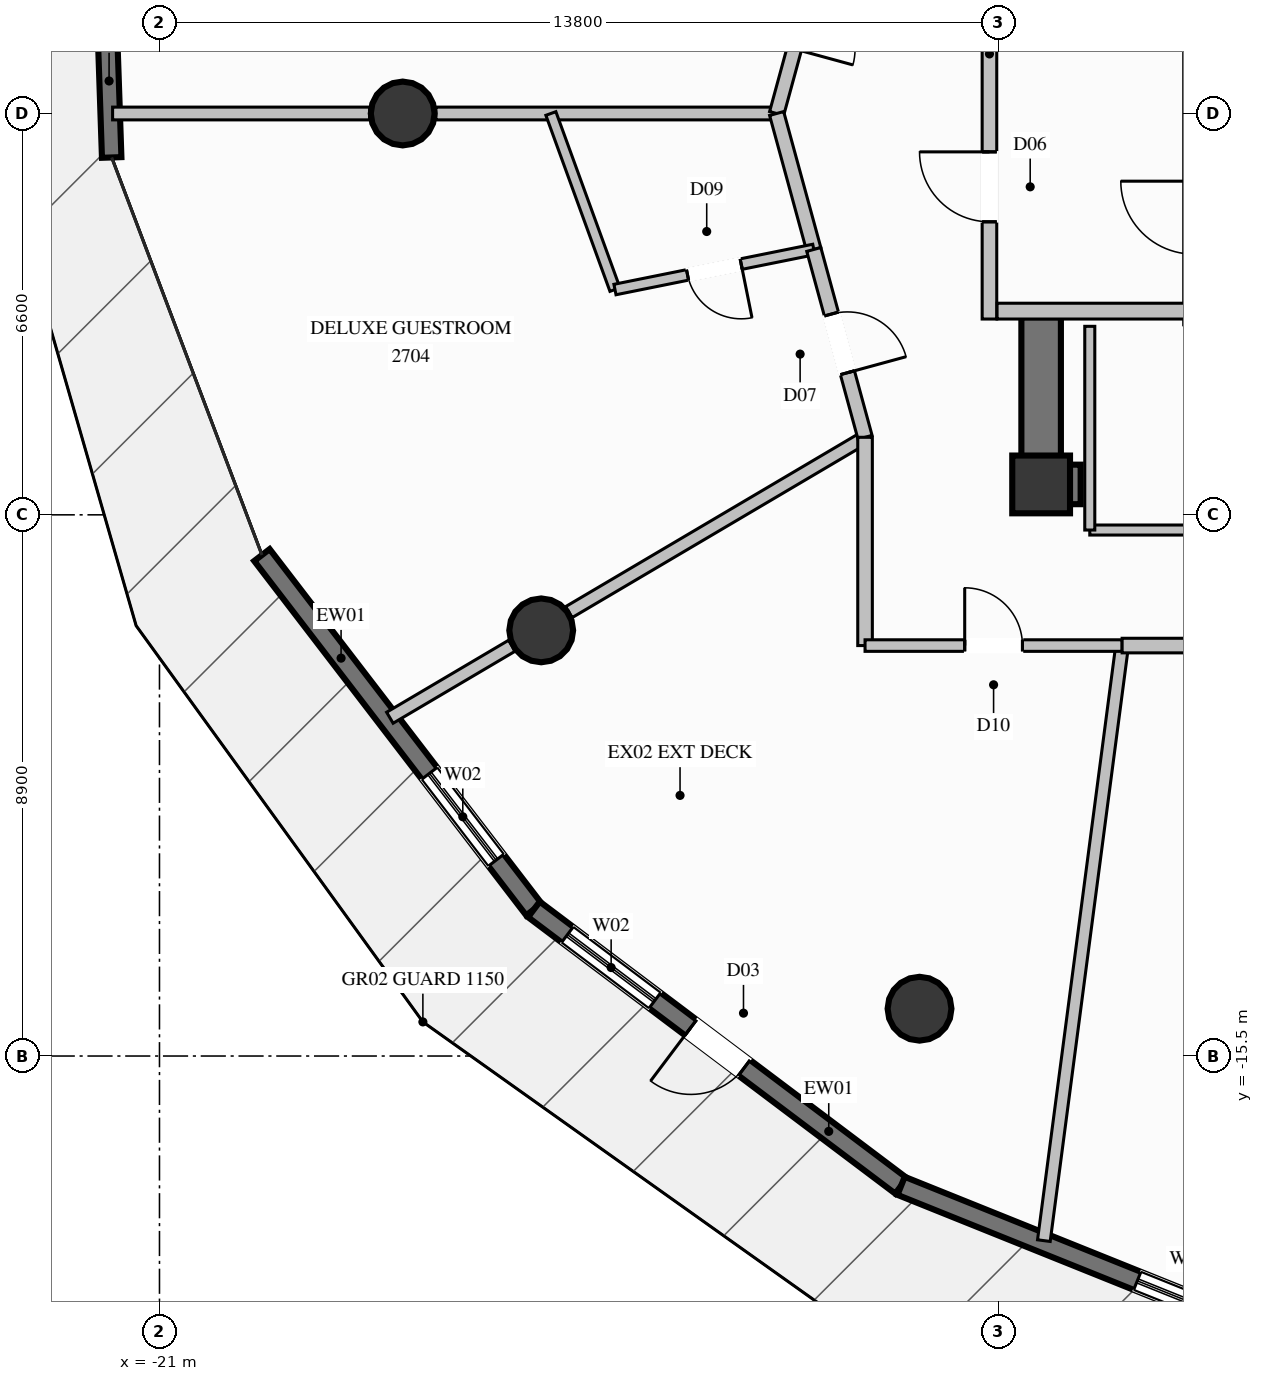
"""IFC4 building model, lengths in metres.
Left out: names, types, materials, properties, quantities, classifications, styles, units other than length and angle.
Written with IfcOpenShell. Run it as: python <this file> out.ifc"""

import sys

from ifc_helpers import new_model, si_unit, direction, frame, frame_2d, origin, origin_2d, place, context, subcontext, project, spatial, rectangle, circle, extrude, element, fill, save


model = new_model("IFC4")
c1 = context("Model", 3, precision=1e-05, world=origin(), true_north=direction((0.0, 1.0)))
c2 = subcontext(c1, "Body", "Model", "MODEL_VIEW")
j1 = project(units=[si_unit("LENGTHUNIT", "METRE"), si_unit("PLANEANGLEUNIT", "RADIAN")], contexts=[c1])
p1 = place(None, origin())
s1 = spatial("IfcSite", under=j1, at=p1, CompositionType="ELEMENT")
p2 = place(p1, origin())
s2 = spatial("IfcBuilding", under=s1, at=p2, CompositionType="ELEMENT")
p3 = place(p2, frame((0.0, 0.0, 102.6)))
s3 = spatial("IfcBuildingStorey", under=s2, at=p3, CompositionType="ELEMENT", Elevation=102.6)
p4 = place(p3, frame((-6.5, -6.1, 0.0), z_axis=(0.0, 0.0, 1.0), x_axis=(1.0, 0.0, 0.0)))
e1 = element("IfcColumn", 1, at=p4, inside=s3, PredefinedType="COLUMN", context=c2, shape_type="SweptSolid", body=[
    extrude(rectangle(XDim=0.95, YDim=0.95, at=origin_2d()), origin(), (0.0, 0.0, 1.0), 3.6),
])
p5 = place(p3, frame((-6.175, -6.1, 0.0), z_axis=(0.0, 0.0, 1.0), x_axis=(1.0, 0.0, 0.0)))
e2 = element("IfcWall", 2, at=p5, inside=s3, PredefinedType="SHEAR", context=c2, shape_type="SweptSolid", body=[
    extrude(rectangle(XDim=0.325, YDim=0.65, at=frame_2d((0.163, 0.0))), origin(), (0.0, 0.0, 1.0), 3.6),
])
p6 = place(p3, frame((-6.5, -6.425, 0.0), z_axis=(0.0, 0.0, 1.0), x_axis=(0.0, 1.0, 0.0)))
e3 = element("IfcWall", 3, at=p6, inside=s3, PredefinedType="SHEAR", context=c2, shape_type="SweptSolid", body=[
    extrude(rectangle(XDim=3.075, YDim=0.65, at=frame_2d((1.538, 0.0))), origin(), (0.0, 0.0, 1.0), 3.6),
])
for number, where, z_axis, x_axis in (
    (4, (-17.0, 0.0, 0.0), (0.0, 0.0, 1.0), (1.0, 0.0, 0.0)),
    (5, (-14.722, -8.5, 0.0), (0.0, 0.0, 1.0), (1.0, 0.0, 0.0)),
    (6, (-8.5, -14.722, 0.0), (0.0, 0.0, 1.0), (1.0, 0.0, 0.0)),
):
    element("IfcColumn", number, at=place(p3, frame(where, z_axis=z_axis, x_axis=x_axis)), inside=s3, PredefinedType="COLUMN", context=c2, shape_type="SweptSolid", body=[
        extrude(circle(Radius=0.525, at=origin_2d()), origin(), (0.0, 0.0, 1.0), 3.6),
    ])
p7 = place(p3, frame((-21.786, -0.723, 0.0), z_axis=(0.0, 0.0, 1.0), x_axis=(-0.034040106065, 0.999420467661, 0.0)))
e7 = element("IfcWall", 7, at=p7, inside=s3, PredefinedType="SOLIDWALL", context=c2, shape_type="SweptSolid", body=[
    extrude(rectangle(XDim=6.613, YDim=0.32, at=frame_2d((3.306, 0.0))), origin(), (0.0, 0.0, 1.0), 3.35),
])
p8 = place(p7, frame((2.767, 0.0, 0.35)))
e8 = element("IfcOpeningElement", 8, at=p8, cuts=e7, PredefinedType="OPENING", context=c2, shape_type="SweptSolid", body=[
    extrude(rectangle(XDim=1.8, YDim=2.6, at=frame_2d((0.9, 1.3))), frame((0.0, 0.17, 0.0), z_axis=(0.0, -1.0, 0.0), x_axis=(1.0, 0.0, 0.0)), (0.0, 0.0, 1.0), 0.34),
])
p9 = place(p3, frame((-14.842, -13.089, 0.0), z_axis=(0.0, 0.0, 1.0), x_axis=(-0.608831916989, 0.793299247986, 0.0)))
e9 = element("IfcWall", 9, at=p9, inside=s3, PredefinedType="SOLIDWALL", context=c2, shape_type="SweptSolid", body=[
    extrude(rectangle(XDim=7.347, YDim=0.32, at=frame_2d((3.673, 0.0))), origin(), (0.0, 0.0, 1.0), 3.35),
])
p10 = place(p9, frame((1.021, 0.0, 0.35)))
e10 = element("IfcOpeningElement", 10, at=p10, cuts=e9, PredefinedType="OPENING", context=c2, shape_type="SweptSolid", body=[
    extrude(rectangle(XDim=1.8, YDim=2.6, at=frame_2d((0.9, 1.3))), frame((0.0, 0.17, 0.0), z_axis=(0.0, -1.0, 0.0), x_axis=(1.0, 0.0, 0.0)), (0.0, 0.0, 1.0), 0.34),
])
p11 = place(p3, frame((-8.803, -17.635, 0.0), z_axis=(0.0, 0.0, 1.0), x_axis=(-0.798944530401, 0.601404720087, 0.0)))
e11 = element("IfcWall", 11, at=p11, inside=s3, PredefinedType="SOLIDWALL", context=c2, shape_type="SweptSolid", body=[
    extrude(rectangle(XDim=7.559, YDim=0.32, at=frame_2d((3.779, 0.0))), origin(), (0.0, 0.0, 1.0), 3.35),
])
p12 = place(p11, frame((5.069, 0.0, 0.35)))
e12 = element("IfcOpeningElement", 12, at=p12, cuts=e11, PredefinedType="OPENING", context=c2, shape_type="SweptSolid", body=[
    extrude(rectangle(XDim=1.8, YDim=2.6, at=frame_2d((0.9, 1.3))), frame((0.0, 0.17, 0.0), z_axis=(0.0, -1.0, 0.0), x_axis=(1.0, 0.0, 0.0)), (0.0, 0.0, 1.0), 0.34),
])
p13 = place(p11, frame((3.229, 0.0, 0.0)))
e13 = element("IfcOpeningElement", 13, at=p13, cuts=e11, PredefinedType="OPENING", context=c2, shape_type="SweptSolid", body=[
    extrude(rectangle(XDim=1.1, YDim=2.2, at=frame_2d((0.55, 1.1))), frame((0.0, 0.17, 0.0), z_axis=(0.0, -1.0, 0.0), x_axis=(1.0, 0.0, 0.0)), (0.0, 0.0, 1.0), 0.34),
])
p14 = place(p3, frame((-1.79, -20.455, 0.0), z_axis=(0.0, 0.0, 1.0), x_axis=(-0.927795739468, 0.373088549577, 0.0)))
e14 = element("IfcWall", 14, at=p14, inside=s3, PredefinedType="SOLIDWALL", context=c2, shape_type="SweptSolid", body=[
    extrude(rectangle(XDim=7.559, YDim=0.32, at=frame_2d((3.779, 0.0))), origin(), (0.0, 0.0, 1.0), 3.35),
])
p15 = place(p14, frame((1.572, 0.0, 0.35)))
e15 = element("IfcOpeningElement", 15, at=p15, cuts=e14, PredefinedType="OPENING", context=c2, shape_type="SweptSolid", body=[
    extrude(rectangle(XDim=1.8, YDim=2.6, at=frame_2d((0.9, 1.3))), frame((0.0, 0.17, 0.0), z_axis=(0.0, -1.0, 0.0), x_axis=(1.0, 0.0, 0.0)), (0.0, 0.0, 1.0), 0.34),
])
p16 = place(p3, frame((-7.35, -3.38, 0.0), z_axis=(0.0, 0.0, 1.0), x_axis=(0.0, 1.0, 0.0)))
e16 = element("IfcWall", 16, at=p16, inside=s3, PredefinedType="PARTITIONING", context=c2, shape_type="SweptSolid", body=[
    extrude(rectangle(XDim=5.72, YDim=0.24, at=frame_2d((2.86, 0.0))), origin(), (0.0, 0.0, 1.0), 2.435),
])
p17 = place(p16, frame((1.599, 0.0, 0.0)))
e17 = element("IfcOpeningElement", 17, at=p17, cuts=e16, PredefinedType="OPENING", context=c2, shape_type="SweptSolid", body=[
    extrude(rectangle(XDim=1.15, YDim=2.2, at=frame_2d((0.575, 1.1))), frame((0.0, 0.13, 0.0), z_axis=(0.0, -1.0, 0.0), x_axis=(1.0, 0.0, 0.0)), (0.0, 0.0, 1.0), 0.26),
])
p18 = place(p3, frame((-7.225, -3.25, 0.0), z_axis=(0.0, 0.0, 1.0), x_axis=(1.0, 0.0, 0.0)))
e18 = element("IfcWall", 18, at=p18, inside=s3, PredefinedType="PARTITIONING", context=c2, shape_type="SweptSolid", body=[
    extrude(rectangle(XDim=3.095, YDim=0.26, at=frame_2d((1.548, 0.0))), origin(), (0.0, 0.0, 1.0), 3.35),
])
p19 = place(p3, frame((-5.7, -6.85, 0.0), z_axis=(0.0, 0.0, 1.0), x_axis=(1.0, 0.0, 0.0)))
e19 = element("IfcWall", 19, at=p19, inside=s3, PredefinedType="PARTITIONING", context=c2, shape_type="SweptSolid", body=[
    extrude(rectangle(XDim=4.35, YDim=0.165, at=frame_2d((2.175, 0.0))), origin(), (0.0, 0.0, 1.0), 2.435),
])
p20 = place(p19, frame((1.7, 0.0, 0.0)))
e20 = element("IfcOpeningElement", 20, at=p20, cuts=e19, PredefinedType="OPENING", context=c2, shape_type="SweptSolid", body=[
    extrude(rectangle(XDim=0.95, YDim=2.1, at=frame_2d((0.475, 1.05))), frame((0.0, 0.093, 0.0), z_axis=(0.0, -1.0, 0.0), x_axis=(1.0, 0.0, 0.0)), (0.0, 0.0, 1.0), 0.185),
])
p21 = place(p3, frame((-5.7, -3.5, 0.0), z_axis=(0.0, 0.0, 1.0), x_axis=(0.0, -1.0, 0.0)))
e21 = element("IfcWall", 21, at=p21, inside=s3, PredefinedType="PARTITIONING", context=c2, shape_type="SweptSolid", body=[
    extrude(rectangle(XDim=3.35, YDim=0.165, at=frame_2d((1.675, 0.0))), origin(), (0.0, 0.0, 1.0), 2.435),
])
p22 = place(p3, frame((-10.85, 0.0, 0.0), z_axis=(0.0, 0.0, 1.0), x_axis=(-1.0, 0.0, 0.0)))
e22 = element("IfcWall", 22, at=p22, inside=s3, PredefinedType="PARTITIONING", context=c2, shape_type="SweptSolid", body=[
    extrude(rectangle(XDim=5.605, YDim=0.21, at=frame_2d((2.802, 0.0))), origin(), (0.0, 0.0, 1.0), 3.35),
])
p23 = place(p3, frame((-17.545, 0.0, 0.0), z_axis=(0.0, 0.0, 1.0), x_axis=(-1.0, 0.0, 0.0)))
e23 = element("IfcWall", 23, at=p23, inside=s3, PredefinedType="PARTITIONING", context=c2, shape_type="SweptSolid", body=[
    extrude(rectangle(XDim=4.226, YDim=0.21, at=frame_2d((2.113, 0.0))), origin(), (0.0, 0.0, 1.0), 3.35),
])
p24 = place(p3, frame((-9.396, -5.325, 0.0), z_axis=(0.0, 0.0, 1.0), x_axis=(-0.861187639937, -0.508287171607, 0.0)))
e24 = element("IfcWall", 24, at=p24, inside=s3, PredefinedType="PARTITIONING", context=c2, shape_type="SweptSolid", body=[
    extrude(rectangle(XDim=5.656, YDim=0.21, at=frame_2d((2.828, 0.0))), origin(), (0.0, 0.0, 1.0), 2.791),
])
p25 = place(p3, frame((-15.205, -8.753, 0.0), z_axis=(0.0, 0.0, 1.0), x_axis=(-0.861151801863, -0.508347886932, 0.0)))
e25 = element("IfcWall", 25, at=p25, inside=s3, PredefinedType="PARTITIONING", context=c2, shape_type="SweptSolid", body=[
    extrude(rectangle(XDim=2.329, YDim=0.21, at=frame_2d((1.165, 0.0))), origin(), (0.0, 0.0, 1.0), 3.35),
])
p26 = place(p3, frame((-10.007, 3.089, 0.0), z_axis=(0.0, 0.0, 1.0), x_axis=(-0.263272237376, -0.964721581093, 0.0)))
e26 = element("IfcWall", 26, at=p26, inside=s3, PredefinedType="PARTITIONING", context=c2, shape_type="SweptSolid", body=[
    extrude(rectangle(XDim=3.202, YDim=0.24, at=frame_2d((1.601, 0.0))), origin(), (0.0, 0.0, 1.0), 3.35),
])
p27 = place(p26, frame((1.101, 0.0, 0.0)))
e27 = element("IfcOpeningElement", 27, at=p27, cuts=e26, PredefinedType="OPENING", context=c2, shape_type="SweptSolid", body=[
    extrude(rectangle(XDim=1.0, YDim=2.2, at=frame_2d((0.5, 1.1))), frame((0.0, 0.13, 0.0), z_axis=(0.0, -1.0, 0.0), x_axis=(1.0, 0.0, 0.0)), (0.0, 0.0, 1.0), 0.26),
])
p28 = place(p3, frame((-10.85, 0.0, 0.0), z_axis=(0.0, 0.0, 1.0), x_axis=(0.263616426241, -0.964627586074, 0.0)))
e28 = element("IfcWall", 28, at=p28, inside=s3, PredefinedType="PARTITIONING", context=c2, shape_type="SweptSolid", body=[
    extrude(rectangle(XDim=2.318, YDim=0.24, at=frame_2d((1.159, 0.0))), origin(), (0.0, 0.0, 1.0), 3.35),
])
p29 = place(p3, frame((-14.563, 0.0, 0.0), z_axis=(0.0, 0.0, 1.0), x_axis=(0.342092982083, -0.939666106449, 0.0)))
e29 = element("IfcWall", 29, at=p29, inside=s3, PredefinedType="PLUMBINGWALL", context=c2, shape_type="SweptSolid", body=[
    extrude(rectangle(XDim=3.081, YDim=0.175, at=frame_2d((1.541, 0.0))), origin(), (0.0, 0.0, 1.0), 3.35),
])
p30 = place(p3, frame((-10.239, -2.236, 0.0), z_axis=(0.0, 0.0, 1.0), x_axis=(-0.980295333609, -0.197537487338, 0.0)))
e30 = element("IfcWall", 30, at=p30, inside=s3, PredefinedType="PLUMBINGWALL", context=c2, shape_type="SweptSolid", body=[
    extrude(rectangle(XDim=3.336, YDim=0.175, at=frame_2d((1.668, 0.0))), origin(), (0.0, 0.0, 1.0), 3.35),
])
p31 = place(p30, frame((1.218, 0.0, 0.0)))
e31 = element("IfcOpeningElement", 31, at=p31, cuts=e30, PredefinedType="OPENING", context=c2, shape_type="SweptSolid", body=[
    extrude(rectangle(XDim=0.9, YDim=2.1, at=frame_2d((0.45, 1.05))), frame((0.0, 0.098, 0.0), z_axis=(0.0, -1.0, 0.0), x_axis=(1.0, 0.0, 0.0)), (0.0, 0.0, 1.0), 0.195),
])
p32 = place(p3, frame((-10.239, -2.236, 0.0), z_axis=(0.0, 0.0, 1.0), x_axis=(0.26329160366, -0.964716295831, 0.0)))
e32 = element("IfcWall", 32, at=p32, inside=s3, PredefinedType="PARTITIONING", context=c2, shape_type="SweptSolid", body=[
    extrude(rectangle(XDim=3.202, YDim=0.24, at=frame_2d((1.601, 0.0))), origin(), (0.0, 0.0, 1.0), 3.35),
])
p33 = place(p32, frame((1.101, 0.0, 0.0)))
e33 = element("IfcOpeningElement", 33, at=p33, cuts=e32, PredefinedType="OPENING", context=c2, shape_type="SweptSolid", body=[
    extrude(rectangle(XDim=1.0, YDim=2.2, at=frame_2d((0.5, 1.1))), frame((0.0, 0.13, 0.0), z_axis=(0.0, -1.0, 0.0), x_axis=(1.0, 0.0, 0.0)), (0.0, 0.0, 1.0), 0.26),
])
p34 = place(p3, frame((-5.168, -8.75, 0.0), z_axis=(0.0, 0.0, 1.0), x_axis=(-0.130403964366, -0.991460945311, 0.0)))
e34 = element("IfcWall", 34, at=p34, inside=s3, PredefinedType="PARTITIONING", context=c2, shape_type="SweptSolid", body=[
    extrude(rectangle(XDim=9.87, YDim=0.21, at=frame_2d((4.935, 0.0))), origin(), (0.0, 0.0, 1.0), 3.35),
])
p35 = place(p3, frame((-9.396, -5.325, 0.0), z_axis=(0.0, 0.0, 1.0), x_axis=(0.0, -1.0, 0.0)))
e35 = element("IfcWall", 35, at=p35, inside=s3, PredefinedType="PARTITIONING", context=c2, shape_type="SweptSolid", body=[
    extrude(rectangle(XDim=3.425, YDim=0.24, at=frame_2d((1.712, 0.0))), origin(), (0.0, 0.0, 1.0), 3.35),
])
p36 = place(p3, frame((-9.396, -8.75, 0.0), z_axis=(0.0, 0.0, 1.0), x_axis=(1.0, 0.0, 0.0)))
e36 = element("IfcWall", 36, at=p36, inside=s3, PredefinedType="PARTITIONING", context=c2, shape_type="SweptSolid", body=[
    extrude(rectangle(XDim=4.228, YDim=0.19, at=frame_2d((2.114, 0.0))), origin(), (0.0, 0.0, 1.0), 3.35),
])
p37 = place(p36, frame((1.639, 0.0, 0.0)))
e37 = element("IfcOpeningElement", 37, at=p37, cuts=e36, PredefinedType="OPENING", context=c2, shape_type="SweptSolid", body=[
    extrude(rectangle(XDim=0.95, YDim=2.1, at=frame_2d((0.475, 1.05))), frame((0.0, 0.105, 0.0), z_axis=(0.0, -1.0, 0.0), x_axis=(1.0, 0.0, 0.0)), (0.0, 0.0, 1.0), 0.21),
])
p38 = place(p3, frame((-5.168, -8.75, 0.0), z_axis=(0.0, 0.0, 1.0), x_axis=(1.0, 0.0, 0.0)))
e38 = element("IfcWall", 38, at=p38, inside=s3, PredefinedType="PARTITIONING", context=c2, shape_type="SweptSolid", body=[
    extrude(rectangle(XDim=5.168, YDim=0.24, at=frame_2d((2.584, 0.0))), origin(), (0.0, 0.0, 1.0), 3.35),
])
p39 = place(p10, origin())
e39 = element("IfcWindow", 39, at=p39, inside=s3, PartitioningType="SINGLE_PANEL", PredefinedType="WINDOW", context=c2, shape_type="SweptSolid", body=[
    extrude(rectangle(XDim=1.8, YDim=2.6, at=frame_2d((0.9, 1.3))), frame((0.0, 0.03, 0.0), z_axis=(0.0, -1.0, 0.0), x_axis=(1.0, 0.0, 0.0)), (0.0, 0.0, 1.0), 0.06),
])
fill(e10, e39)
p40 = place(p12, origin())
e40 = element("IfcWindow", 40, at=p40, inside=s3, PartitioningType="SINGLE_PANEL", PredefinedType="WINDOW", context=c2, shape_type="SweptSolid", body=[
    extrude(rectangle(XDim=1.8, YDim=2.6, at=frame_2d((0.9, 1.3))), frame((0.0, 0.03, 0.0), z_axis=(0.0, -1.0, 0.0), x_axis=(1.0, 0.0, 0.0)), (0.0, 0.0, 1.0), 0.06),
])
fill(e12, e40)
p41 = place(p13, origin())
e41 = element("IfcDoor", 41, at=p41, inside=s3, OperationType="SINGLE_SWING_RIGHT", PredefinedType="DOOR", context=c2, shape_type="SweptSolid", body=[
    extrude(rectangle(XDim=1.1, YDim=2.2, at=frame_2d((0.55, 1.1))), frame((0.0, 0.025, 0.0), z_axis=(0.0, -1.0, 0.0), x_axis=(1.0, 0.0, 0.0)), (0.0, 0.0, 1.0), 0.05),
])
fill(e13, e41)
p42 = place(p15, origin())
e42 = element("IfcWindow", 42, at=p42, inside=s3, PartitioningType="SINGLE_PANEL", PredefinedType="WINDOW", context=c2, shape_type="SweptSolid", body=[
    extrude(rectangle(XDim=1.8, YDim=2.6, at=frame_2d((0.9, 1.3))), frame((0.0, 0.03, 0.0), z_axis=(0.0, -1.0, 0.0), x_axis=(1.0, 0.0, 0.0)), (0.0, 0.0, 1.0), 0.06),
])
fill(e15, e42)
p43 = place(p17, origin())
e43 = element("IfcDoor", 43, at=p43, inside=s3, OperationType="SINGLE_SWING_RIGHT", PredefinedType="DOOR", context=c2, shape_type="SweptSolid", body=[
    extrude(rectangle(XDim=1.15, YDim=2.2, at=frame_2d((0.575, 1.1))), frame((0.0, 0.025, 0.0), z_axis=(0.0, -1.0, 0.0), x_axis=(1.0, 0.0, 0.0)), (0.0, 0.0, 1.0), 0.05),
])
fill(e17, e43)
p44 = place(p31, origin())
e44 = element("IfcDoor", 44, at=p44, inside=s3, OperationType="SINGLE_SWING_LEFT", PredefinedType="DOOR", context=c2, shape_type="SweptSolid", body=[
    extrude(rectangle(XDim=0.9, YDim=2.1, at=frame_2d((0.45, 1.05))), frame((0.0, 0.025, 0.0), z_axis=(0.0, -1.0, 0.0), x_axis=(1.0, 0.0, 0.0)), (0.0, 0.0, 1.0), 0.05),
])
fill(e31, e44)
p45 = place(p33, origin())
e45 = element("IfcDoor", 45, at=p45, inside=s3, OperationType="SINGLE_SWING_RIGHT", PredefinedType="DOOR", context=c2, shape_type="SweptSolid", body=[
    extrude(rectangle(XDim=1.0, YDim=2.2, at=frame_2d((0.5, 1.1))), frame((0.0, 0.025, 0.0), z_axis=(0.0, -1.0, 0.0), x_axis=(1.0, 0.0, 0.0)), (0.0, 0.0, 1.0), 0.05),
])
fill(e33, e45)
p46 = place(p37, origin())
e46 = element("IfcDoor", 46, at=p46, inside=s3, OperationType="SINGLE_SWING_LEFT", PredefinedType="DOOR", context=c2, shape_type="SweptSolid", body=[
    extrude(rectangle(XDim=0.95, YDim=2.1, at=frame_2d((0.475, 1.05))), frame((0.0, 0.025, 0.0), z_axis=(0.0, -1.0, 0.0), x_axis=(1.0, 0.0, 0.0)), (0.0, 0.0, 1.0), 0.05),
])
fill(e37, e46)
save(model, sys.argv[1])
